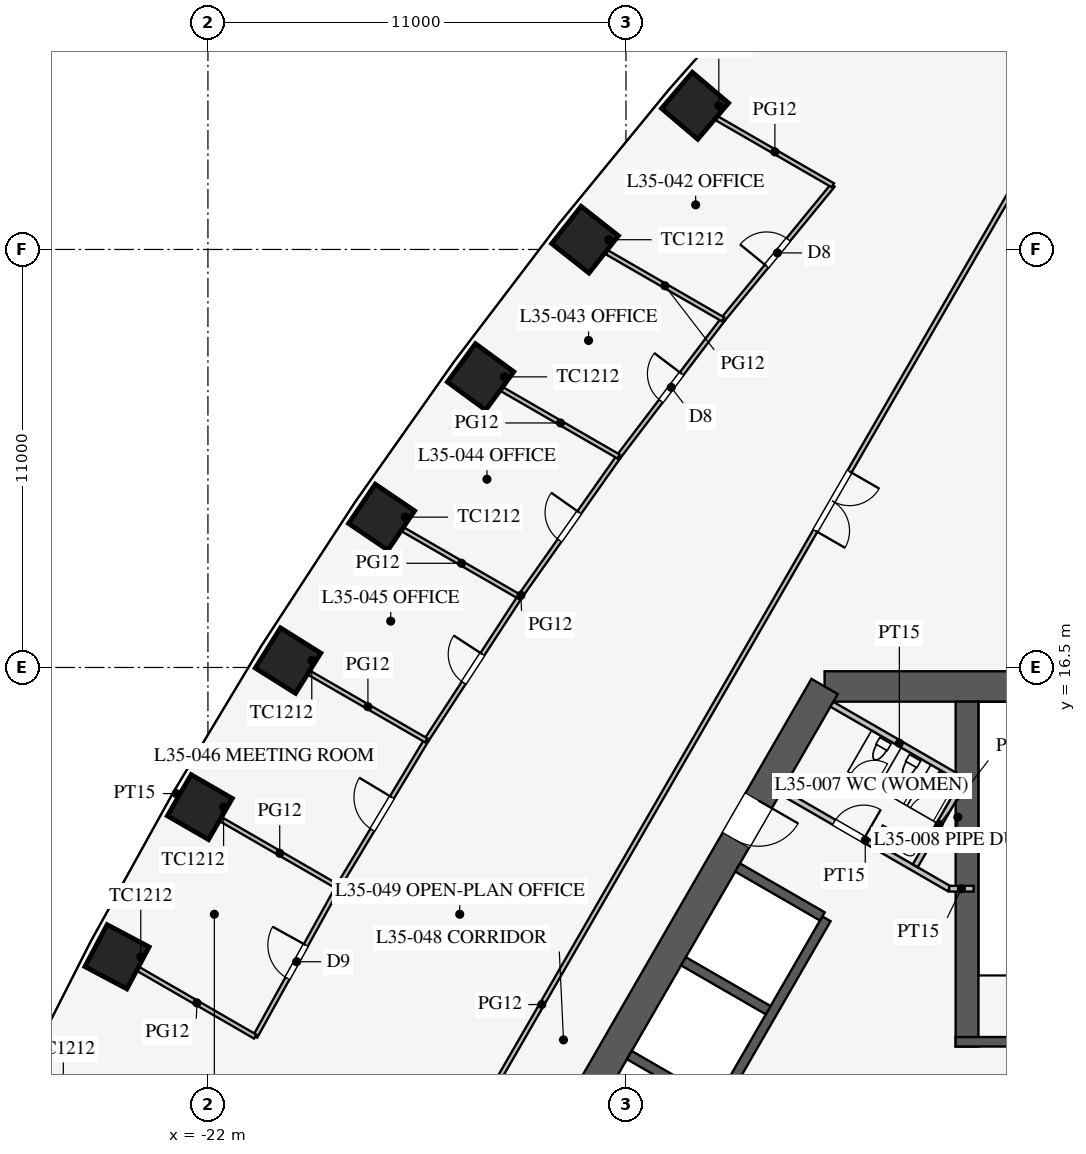
"""IFC4 building model, lengths in metres.
Left out: names, types, materials, properties, quantities, classifications, styles, units other than length and angle.
Written with IfcOpenShell. Run it as: python <this file> out.ifc"""

import sys

from ifc_helpers import new_model, si_unit, direction, frame, frame_2d, origin, origin_2d, place, context, subcontext, project, spatial, rectangle, extrude, element, fill, save


model = new_model("IFC4")
c1 = context("Model", 3, precision=1e-05, world=origin(), true_north=direction((0.0, 1.0)))
c2 = subcontext(c1, "Body", "Model", "MODEL_VIEW")
j1 = project(units=[si_unit("LENGTHUNIT", "METRE"), si_unit("PLANEANGLEUNIT", "RADIAN")], contexts=[c1])
p1 = place(None, origin())
s1 = spatial("IfcSite", under=j1, at=p1, CompositionType="ELEMENT")
p2 = place(p1, origin())
s2 = spatial("IfcBuilding", under=s1, at=p2, CompositionType="ELEMENT")
p3 = place(p2, frame((0.0, 0.0, 153.5)))
s3 = spatial("IfcBuildingStorey", under=s2, at=p3, CompositionType="ELEMENT", Elevation=153.5)
for number, where, z_axis, x_axis in (
    (1, (-9.182, 31.282, 0.0), (0.0, 0.0, 1.0), (-0.648, -0.762, 0.0)),
    (2, (-12.077, 27.757, 0.0), (0.0, 0.0, 1.0), (-0.62, -0.785, 0.0)),
    (3, (-14.825, 24.148, 0.0), (0.0, 0.0, 1.0), (-0.591, -0.807, 0.0)),
    (4, (-17.43, 20.456, 0.0), (0.0, 0.0, 1.0), (-0.561, -0.828, 0.0)),
    (5, (-19.893, 16.681, 0.0), (0.0, 0.0, 1.0), (-0.531, -0.847, 0.0)),
    (6, (-22.213, 12.825, 0.0), (0.0, 0.0, 1.0), (-0.5, -0.866, 0.0)),
    (7, (-24.393, 8.887, 0.0), (0.0, 0.0, 1.0), (-0.468, -0.883, 0.0)),
):
    element("IfcColumn", number, at=place(p3, frame(where, z_axis=z_axis, x_axis=x_axis)), inside=s3, PredefinedType="COLUMN", context=c2, shape_type="SweptSolid", body=[
        extrude(rectangle(XDim=1.25, YDim=1.25, at=origin_2d()), origin(), (0.0, 0.0, 1.0), 4.2),
    ])
p4 = place(p3, frame((5.773, 16.0, 0.0), z_axis=(0.0, 0.0, 1.0), x_axis=(-1.0, 0.0, 0.0)))
e8 = element("IfcWall", 8, at=p4, inside=s3, PredefinedType="SHEAR", context=c2, shape_type="SweptSolid", body=[
    extrude(rectangle(XDim=11.547, YDim=0.8, at=frame_2d((5.773, 0.0))), origin(), (0.0, 0.0, 1.0), 4.2),
])
p5 = place(p3, frame((-5.773, 16.0, 0.0), z_axis=(0.0, 0.0, 1.0), x_axis=(-0.500002442456, -0.866023993627, 0.0)))
e9 = element("IfcWall", 9, at=p5, inside=s3, PredefinedType="SHEAR", context=c2, shape_type="SweptSolid", body=[
    extrude(rectangle(XDim=21.939, YDim=0.8, at=frame_2d((10.97, 0.0))), origin(), (0.0, 0.0, 1.0), 4.2),
])
p6 = place(p5, frame((17.27, 0.0, 0.0)))
e10 = element("IfcOpeningElement", 10, at=p6, cuts=e9, PredefinedType="OPENING", context=c2, shape_type="SweptSolid", body=[
    extrude(rectangle(XDim=1.2, YDim=2.1, at=frame_2d((0.6, 1.05))), frame((0.0, 0.41, 0.0), z_axis=(0.0, -1.0, 0.0), x_axis=(1.0, 0.0, 0.0)), (0.0, 0.0, 1.0), 0.82),
])
p7 = place(p5, frame((3.47, 0.0, 0.0)))
e11 = element("IfcOpeningElement", 11, at=p7, cuts=e9, PredefinedType="OPENING", context=c2, shape_type="SweptSolid", body=[
    extrude(rectangle(XDim=1.2, YDim=2.1, at=frame_2d((0.6, 1.05))), frame((0.0, 0.41, 0.0), z_axis=(0.0, -1.0, 0.0), x_axis=(1.0, 0.0, 0.0)), (0.0, 0.0, 1.0), 0.82),
])
p8 = place(p3, frame((-5.724, 9.886, 0.0), z_axis=(0.0, 0.0, 1.0), x_axis=(-0.500001763848, -0.866024385424, 0.0)))
e12 = element("IfcWall", 12, at=p8, inside=s3, PredefinedType="SHEAR", context=c2, shape_type="SweptSolid", body=[
    extrude(rectangle(XDim=11.4, YDim=0.25, at=frame_2d((5.7, 0.0))), origin(), (0.0, 0.0, 1.0), 4.2),
])
p9 = place(p8, frame((6.525, 0.0, 0.0)))
e13 = element("IfcOpeningElement", 13, at=p9, cuts=e12, PredefinedType="OPENING", context=c2, shape_type="SweptSolid", body=[
    extrude(rectangle(XDim=1.2, YDim=2.2, at=frame_2d((0.6, 1.1))), frame((0.0, 0.135, 0.0), z_axis=(0.0, -1.0, 0.0), x_axis=(1.0, 0.0, 0.0)), (0.0, 0.0, 1.0), 0.27),
])
p10 = place(p8, frame((9.375, 0.0, 0.0)))
e14 = element("IfcOpeningElement", 14, at=p10, cuts=e12, PredefinedType="OPENING", context=c2, shape_type="SweptSolid", body=[
    extrude(rectangle(XDim=1.2, YDim=2.2, at=frame_2d((0.6, 1.1))), frame((0.0, 0.135, 0.0), z_axis=(0.0, -1.0, 0.0), x_axis=(1.0, 0.0, 0.0)), (0.0, 0.0, 1.0), 0.27),
])
p11 = place(p3, frame((-5.832, 9.949, 0.0), z_axis=(0.0, 0.0, 1.0), x_axis=(-0.866029291668, 0.499993265928, 0.0)))
e15 = element("IfcWall", 15, at=p11, inside=s3, PredefinedType="SHEAR", context=c2, shape_type="SweptSolid", body=[
    extrude(rectangle(XDim=2.575, YDim=0.25, at=frame_2d((1.288, 0.0))), origin(), (0.0, 0.0, 1.0), 4.2),
])
for number, where, z_axis, x_axis in (
    (16, (-7.257, 7.481, 0.0), (0.0, 0.0, 1.0), (-0.866, 0.5, 0.0)),
    (17, (-8.682, 5.012, 0.0), (0.0, 0.0, 1.0), (-0.866, 0.5, 0.0)),
):
    element("IfcWall", number, at=place(p3, frame(where, z_axis=z_axis, x_axis=x_axis)), inside=s3, PredefinedType="SHEAR", context=c2, shape_type="SweptSolid", body=[
        extrude(rectangle(XDim=2.575, YDim=0.25, at=frame_2d((1.288, 0.0))), origin(), (0.0, 0.0, 1.0), 4.2),
    ])
p12 = place(p3, frame((-2.025, 6.525, 0.0), z_axis=(0.0, 0.0, 1.0), x_axis=(0.0, 1.0, 0.0)))
e18 = element("IfcWall", 18, at=p12, inside=s3, PredefinedType="SHEAR", context=c2, shape_type="SweptSolid", body=[
    extrude(rectangle(XDim=9.075, YDim=0.6, at=frame_2d((4.538, 0.0))), origin(), (0.0, 0.0, 1.0), 4.2),
])
p13 = place(p3, frame((2.325, 6.65, 0.0), z_axis=(0.0, 0.0, 1.0), x_axis=(-1.0, 0.0, 0.0)))
e19 = element("IfcWall", 19, at=p13, inside=s3, PredefinedType="SHEAR", context=c2, shape_type="SweptSolid", body=[
    extrude(rectangle(XDim=4.65, YDim=0.25, at=frame_2d((2.325, 0.0))), origin(), (0.0, 0.0, 1.0), 4.2),
])
p14 = place(p13, frame((1.525, 0.0, 0.0)))
e20 = element("IfcOpeningElement", 20, at=p14, cuts=e19, PredefinedType="OPENING", context=c2, shape_type="SweptSolid", body=[
    extrude(rectangle(XDim=1.6, YDim=2.1, at=frame_2d((0.8, 1.05))), frame((0.0, 0.135, 0.0), z_axis=(0.0, -1.0, 0.0), x_axis=(1.0, 0.0, 0.0)), (0.0, 0.0, 1.0), 0.27),
])
p15 = place(p3, frame((-2.495, 10.678, 0.0), z_axis=(0.0, 0.0, 1.0), x_axis=(-0.86602216432, 0.500005610874, 0.0)))
e21 = element("IfcWall", 21, at=p15, inside=s3, PredefinedType="PARTITIONING", context=c2, shape_type="SweptSolid", body=[
    extrude(rectangle(XDim=5.1, YDim=0.15, at=frame_2d((2.55, 0.0))), origin(), (0.0, 0.0, 1.0), 4.0),
])
p16 = place(p15, frame((2.6, 0.0, 0.0)))
e22 = element("IfcOpeningElement", 22, at=p16, cuts=e21, PredefinedType="OPENING", context=c2, shape_type="SweptSolid", body=[
    extrude(rectangle(XDim=0.9, YDim=2.1, at=frame_2d((0.45, 1.05))), frame((0.0, 0.085, 0.0), z_axis=(0.0, -1.0, 0.0), x_axis=(1.0, 0.0, 0.0)), (0.0, 0.0, 1.0), 0.17),
])
p17 = place(p3, frame((-2.495, 10.678, 0.0), z_axis=(0.0, 0.0, 1.0), x_axis=(1.0, 0.0, 0.0)))
e23 = element("IfcWall", 23, at=p17, inside=s3, PredefinedType="PARTITIONING", context=c2, shape_type="SweptSolid", body=[
    extrude(rectangle(XDim=0.645, YDim=0.15, at=frame_2d((0.323, 0.0))), origin(), (0.0, 0.0, 1.0), 4.0),
])
p18 = place(p3, frame((-2.031, 13.482, 0.0), z_axis=(0.0, 0.0, 1.0), x_axis=(-0.866050731258, 0.499956128963, 0.0)))
e24 = element("IfcWall", 24, at=p18, inside=s3, PredefinedType="PARTITIONING", context=c2, shape_type="SweptSolid", body=[
    extrude(rectangle(XDim=4.1, YDim=0.15, at=frame_2d((2.05, 0.0))), origin(), (0.0, 0.0, 1.0), 4.0),
])
p19 = place(p3, frame((-3.389, 11.281, 0.0), z_axis=(0.0, 0.0, 1.0), x_axis=(0.499989096993, 0.866031698547, 0.0)))
e25 = element("IfcWall", 25, at=p19, inside=s3, PredefinedType="PARTITIONING", context=c2, shape_type="SweptSolid", body=[
    extrude(rectangle(XDim=2.51, YDim=0.15, at=frame_2d((1.255, 0.0))), origin(), (0.0, 0.0, 1.0), 4.0),
])
p20 = place(p3, frame((-0.016, 30.491, 0.0), z_axis=(0.0, 0.0, 1.0), x_axis=(-0.50000091641, -0.866024874695, 0.0)))
e26 = element("IfcWall", 26, at=p20, inside=s3, PredefinedType="PARTITIONING", context=c2, shape_type="SweptSolid", body=[
    extrude(rectangle(XDim=52.796, YDim=0.12, at=frame_2d((26.398, 0.0))), origin(), (0.0, 0.0, 1.0), 2.9),
])
p21 = place(p20, frame((10.2, 0.0, 0.15)))
e27 = element("IfcOpeningElement", 27, at=p21, cuts=e26, PredefinedType="OPENING", context=c2, shape_type="SweptSolid", body=[
    extrude(rectangle(XDim=1.8, YDim=2.1, at=frame_2d((0.9, 1.05))), frame((0.0, 0.07, 0.0), z_axis=(0.0, -1.0, 0.0), x_axis=(1.0, 0.0, 0.0)), (0.0, 0.0, 1.0), 0.14),
])
p22 = place(p20, frame((40.8, 0.0, 0.15)))
e28 = element("IfcOpeningElement", 28, at=p22, cuts=e26, PredefinedType="OPENING", context=c2, shape_type="SweptSolid", body=[
    extrude(rectangle(XDim=1.8, YDim=2.1, at=frame_2d((0.9, 1.05))), frame((0.0, 0.07, 0.0), z_axis=(0.0, -1.0, 0.0), x_axis=(1.0, 0.0, 0.0)), (0.0, 0.0, 1.0), 0.14),
])
p23 = place(p3, frame((-22.758, 13.139, 0.0), z_axis=(0.0, 0.0, 1.0), x_axis=(-0.866063163075, 0.499934593286, 0.0)))
e29 = element("IfcWall", 29, at=p23, inside=s3, PredefinedType="PARTITIONING", context=c2, shape_type="SweptSolid", body=[
    extrude(rectangle(XDim=0.166, YDim=0.15, at=frame_2d((0.083, 0.0))), origin(), (0.0, 0.0, 1.0), 2.9),
])
p24 = place(p3, frame((-18.576, 10.725, 0.0), z_axis=(0.0, 0.0, 1.0), x_axis=(-0.484292898211, -0.874905931368, 0.0)))
e30 = element("IfcWall", 30, at=p24, inside=s3, PredefinedType="PARTITIONING", context=c2, shape_type="SweptSolid", body=[
    extrude(rectangle(XDim=4.501, YDim=0.12, at=frame_2d((2.25, 0.0))), origin(), (0.0, 0.0, 1.0), 2.9),
])
p25 = place(p24, frame((1.75, 0.0, 0.15)))
e31 = element("IfcOpeningElement", 31, at=p25, cuts=e30, PredefinedType="OPENING", context=c2, shape_type="SweptSolid", body=[
    extrude(rectangle(XDim=1.0, YDim=2.1, at=frame_2d((0.5, 1.05))), frame((0.0, 0.07, 0.0), z_axis=(0.0, -1.0, 0.0), x_axis=(1.0, 0.0, 0.0)), (0.0, 0.0, 1.0), 0.14),
])
p26 = place(p3, frame((-11.192, 22.05, 0.0), z_axis=(0.0, 0.0, 1.0), x_axis=(-0.575987178736, -0.817458726745, 0.0)))
e32 = element("IfcWall", 32, at=p26, inside=s3, PredefinedType="PARTITIONING", context=c2, shape_type="SweptSolid", body=[
    extrude(rectangle(XDim=4.518, YDim=0.12, at=frame_2d((2.259, 0.0))), origin(), (0.0, 0.0, 1.0), 2.9),
])
p27 = place(p26, frame((1.8, 0.0, 0.15)))
e33 = element("IfcOpeningElement", 33, at=p27, cuts=e32, PredefinedType="OPENING", context=c2, shape_type="SweptSolid", body=[
    extrude(rectangle(XDim=0.9, YDim=2.1, at=frame_2d((0.45, 1.05))), frame((0.0, 0.07, 0.0), z_axis=(0.0, -1.0, 0.0), x_axis=(1.0, 0.0, 0.0)), (0.0, 0.0, 1.0), 0.14),
])
p28 = place(p3, frame((-8.447, 25.661, 0.0), z_axis=(0.0, 0.0, 1.0), x_axis=(-0.605274299339, -0.796016973789, 0.0)))
e34 = element("IfcWall", 34, at=p28, inside=s3, PredefinedType="PARTITIONING", context=c2, shape_type="SweptSolid", body=[
    extrude(rectangle(XDim=4.536, YDim=0.12, at=frame_2d((2.268, 0.0))), origin(), (0.0, 0.0, 1.0), 2.9),
])
p29 = place(p28, frame((1.8, 0.0, 0.15)))
e35 = element("IfcOpeningElement", 35, at=p29, cuts=e34, PredefinedType="OPENING", context=c2, shape_type="SweptSolid", body=[
    extrude(rectangle(XDim=0.9, YDim=2.1, at=frame_2d((0.45, 1.05))), frame((0.0, 0.07, 0.0), z_axis=(0.0, -1.0, 0.0), x_axis=(1.0, 0.0, 0.0)), (0.0, 0.0, 1.0), 0.14),
])
p30 = place(p3, frame((-5.556, 29.188, 0.0), z_axis=(0.0, 0.0, 1.0), x_axis=(-0.633843962561, -0.773460943503, 0.0)))
e36 = element("IfcWall", 36, at=p30, inside=s3, PredefinedType="PARTITIONING", context=c2, shape_type="SweptSolid", body=[
    extrude(rectangle(XDim=4.561, YDim=0.12, at=frame_2d((2.28, 0.0))), origin(), (0.0, 0.0, 1.0), 2.9),
])
p31 = place(p30, frame((1.85, 0.0, 0.15)))
e37 = element("IfcOpeningElement", 37, at=p31, cuts=e36, PredefinedType="OPENING", context=c2, shape_type="SweptSolid", body=[
    extrude(rectangle(XDim=0.9, YDim=2.1, at=frame_2d((0.45, 1.05))), frame((0.0, 0.07, 0.0), z_axis=(0.0, -1.0, 0.0), x_axis=(1.0, 0.0, 0.0)), (0.0, 0.0, 1.0), 0.14),
])
p32 = place(p3, frame((-16.256, 14.581, 0.0), z_axis=(0.0, 0.0, 1.0), x_axis=(-0.515548366618, -0.856860479703, 0.0)))
e38 = element("IfcWall", 38, at=p32, inside=s3, PredefinedType="PARTITIONING", context=c2, shape_type="SweptSolid", body=[
    extrude(rectangle(XDim=4.501, YDim=0.12, at=frame_2d((2.25, 0.0))), origin(), (0.0, 0.0, 1.0), 2.9),
])
p33 = place(p32, frame((1.75, 0.0, 0.15)))
e39 = element("IfcOpeningElement", 39, at=p33, cuts=e38, PredefinedType="OPENING", context=c2, shape_type="SweptSolid", body=[
    extrude(rectangle(XDim=1.0, YDim=2.1, at=frame_2d((0.5, 1.05))), frame((0.0, 0.07, 0.0), z_axis=(0.0, -1.0, 0.0), x_axis=(1.0, 0.0, 0.0)), (0.0, 0.0, 1.0), 0.14),
])
p34 = place(p3, frame((-13.795, 18.357, 0.0), z_axis=(0.0, 0.0, 1.0), x_axis=(-0.546069464151, -0.837739900161, 0.0)))
e40 = element("IfcWall", 40, at=p34, inside=s3, PredefinedType="PARTITIONING", context=c2, shape_type="SweptSolid", body=[
    extrude(rectangle(XDim=4.507, YDim=0.12, at=frame_2d((2.253, 0.0))), origin(), (0.0, 0.0, 1.0), 2.9),
])
p35 = place(p34, frame((1.8, 0.0, 0.15)))
e41 = element("IfcOpeningElement", 41, at=p35, cuts=e40, PredefinedType="OPENING", context=c2, shape_type="SweptSolid", body=[
    extrude(rectangle(XDim=0.9, YDim=2.1, at=frame_2d((0.45, 1.05))), frame((0.0, 0.07, 0.0), z_axis=(0.0, -1.0, 0.0), x_axis=(1.0, 0.0, 0.0)), (0.0, 0.0, 1.0), 0.14),
])
p36 = place(p3, frame((-18.576, 10.725, 0.0), z_axis=(0.0, 0.0, 1.0), x_axis=(-0.866030760678, 0.499990721473, 0.0)))
e42 = element("IfcWall", 42, at=p36, inside=s3, PredefinedType="PARTITIONING", context=c2, shape_type="SweptSolid", body=[
    extrude(rectangle(XDim=3.545, YDim=0.12, at=frame_2d((1.772, 0.0))), origin(), (0.0, 0.0, 1.0), 2.8),
])
p37 = place(p3, frame((-20.756, 6.787, 0.0), z_axis=(0.0, 0.0, 1.0), x_axis=(-0.866038754309, 0.499976875499, 0.0)))
e43 = element("IfcWall", 43, at=p37, inside=s3, PredefinedType="PARTITIONING", context=c2, shape_type="SweptSolid", body=[
    extrude(rectangle(XDim=3.544, YDim=0.12, at=frame_2d((1.772, 0.0))), origin(), (0.0, 0.0, 1.0), 2.8),
])
p38 = place(p3, frame((-11.192, 22.05, 0.0), z_axis=(0.0, 0.0, 1.0), x_axis=(-0.86605108476, 0.499955516607, 0.0)))
e44 = element("IfcWall", 44, at=p38, inside=s3, PredefinedType="PARTITIONING", context=c2, shape_type="SweptSolid", body=[
    extrude(rectangle(XDim=3.536, YDim=0.12, at=frame_2d((1.768, 0.0))), origin(), (0.0, 0.0, 1.0), 2.6),
])
p39 = place(p3, frame((-8.447, 25.661, 0.0), z_axis=(0.0, 0.0, 1.0), x_axis=(-0.866025485263, 0.499999858875, 0.0)))
e45 = element("IfcWall", 45, at=p39, inside=s3, PredefinedType="PARTITIONING", context=c2, shape_type="SweptSolid", body=[
    extrude(rectangle(XDim=3.53, YDim=0.12, at=frame_2d((1.765, 0.0))), origin(), (0.0, 0.0, 1.0), 2.8),
])
p40 = place(p3, frame((-5.556, 29.188, 0.0), z_axis=(0.0, 0.0, 1.0), x_axis=(-0.866028552163, 0.499994546809, 0.0)))
e46 = element("IfcWall", 46, at=p40, inside=s3, PredefinedType="PARTITIONING", context=c2, shape_type="SweptSolid", body=[
    extrude(rectangle(XDim=3.521, YDim=0.12, at=frame_2d((1.76, 0.0))), origin(), (0.0, 0.0, 1.0), 2.9),
])
p41 = place(p3, frame((-16.256, 14.581, 0.0), z_axis=(0.0, 0.0, 1.0), x_axis=(-0.866008926066, 0.500028539159, 0.0)))
e47 = element("IfcWall", 47, at=p41, inside=s3, PredefinedType="PARTITIONING", context=c2, shape_type="SweptSolid", body=[
    extrude(rectangle(XDim=3.544, YDim=0.12, at=frame_2d((1.772, 0.0))), origin(), (0.0, 0.0, 1.0), 2.8),
])
p42 = place(p3, frame((-13.795, 18.357, 0.0), z_axis=(0.0, 0.0, 1.0), x_axis=(-0.866045526189, 0.499965145353, 0.0)))
e48 = element("IfcWall", 48, at=p42, inside=s3, PredefinedType="PARTITIONING", context=c2, shape_type="SweptSolid", body=[
    extrude(rectangle(XDim=3.541, YDim=0.12, at=frame_2d((1.771, 0.0))), origin(), (0.0, 0.0, 1.0), 2.9),
])
p43 = place(p16, frame((0.9, 0.0, 0.0), z_axis=(0.0, 0.0, 1.0), x_axis=(-1.0, 0.0, 0.0)))
e49 = element("IfcDoor", 49, at=p43, inside=s3, OperationType="SINGLE_SWING_RIGHT", PredefinedType="DOOR", context=c2, shape_type="SweptSolid", body=[
    extrude(rectangle(XDim=0.9, YDim=2.1, at=frame_2d((0.45, 1.05))), frame((0.0, 0.025, 0.0), z_axis=(0.0, -1.0, 0.0), x_axis=(1.0, 0.0, 0.0)), (0.0, 0.0, 1.0), 0.05),
])
fill(e22, e49)
p44 = place(p7, origin())
e50 = element("IfcDoor", 50, at=p44, inside=s3, OperationType="SINGLE_SWING_LEFT", PredefinedType="DOOR", context=c2, shape_type="SweptSolid", body=[
    extrude(rectangle(XDim=1.2, YDim=2.1, at=frame_2d((0.6, 1.05))), frame((0.0, 0.025, 0.0), z_axis=(0.0, -1.0, 0.0), x_axis=(1.0, 0.0, 0.0)), (0.0, 0.0, 1.0), 0.05),
])
fill(e11, e50)
p45 = place(p31, frame((0.9, 0.0, 0.0), z_axis=(0.0, 0.0, 1.0), x_axis=(-1.0, 0.0, 0.0)))
e51 = element("IfcDoor", 51, at=p45, inside=s3, OperationType="SINGLE_SWING_LEFT", PredefinedType="DOOR", context=c2, shape_type="SweptSolid", body=[
    extrude(rectangle(XDim=0.9, YDim=2.1, at=frame_2d((0.45, 1.05))), frame((0.0, 0.025, 0.0), z_axis=(0.0, -1.0, 0.0), x_axis=(1.0, 0.0, 0.0)), (0.0, 0.0, 1.0), 0.05),
])
fill(e37, e51)
p46 = place(p29, frame((0.9, 0.0, 0.0), z_axis=(0.0, 0.0, 1.0), x_axis=(-1.0, 0.0, 0.0)))
e52 = element("IfcDoor", 52, at=p46, inside=s3, OperationType="SINGLE_SWING_RIGHT", PredefinedType="DOOR", context=c2, shape_type="SweptSolid", body=[
    extrude(rectangle(XDim=0.9, YDim=2.1, at=frame_2d((0.45, 1.05))), frame((0.0, 0.025, 0.0), z_axis=(0.0, -1.0, 0.0), x_axis=(1.0, 0.0, 0.0)), (0.0, 0.0, 1.0), 0.05),
])
fill(e35, e52)
p47 = place(p27, frame((0.9, 0.0, 0.0), z_axis=(0.0, 0.0, 1.0), x_axis=(-1.0, 0.0, 0.0)))
e53 = element("IfcDoor", 53, at=p47, inside=s3, OperationType="SINGLE_SWING_RIGHT", PredefinedType="DOOR", context=c2, shape_type="SweptSolid", body=[
    extrude(rectangle(XDim=0.9, YDim=2.1, at=frame_2d((0.45, 1.05))), frame((0.0, 0.025, 0.0), z_axis=(0.0, -1.0, 0.0), x_axis=(1.0, 0.0, 0.0)), (0.0, 0.0, 1.0), 0.05),
])
fill(e33, e53)
p48 = place(p35, frame((0.9, 0.0, 0.0), z_axis=(0.0, 0.0, 1.0), x_axis=(-1.0, 0.0, 0.0)))
e54 = element("IfcDoor", 54, at=p48, inside=s3, OperationType="SINGLE_SWING_RIGHT", PredefinedType="DOOR", context=c2, shape_type="SweptSolid", body=[
    extrude(rectangle(XDim=0.9, YDim=2.1, at=frame_2d((0.45, 1.05))), frame((0.0, 0.025, 0.0), z_axis=(0.0, -1.0, 0.0), x_axis=(1.0, 0.0, 0.0)), (0.0, 0.0, 1.0), 0.05),
])
fill(e41, e54)
p49 = place(p33, frame((1.0, 0.0, 0.0), z_axis=(0.0, 0.0, 1.0), x_axis=(-1.0, 0.0, 0.0)))
e55 = element("IfcDoor", 55, at=p49, inside=s3, OperationType="SINGLE_SWING_RIGHT", PredefinedType="DOOR", context=c2, shape_type="SweptSolid", body=[
    extrude(rectangle(XDim=1.0, YDim=2.1, at=frame_2d((0.5, 1.05))), frame((0.0, 0.025, 0.0), z_axis=(0.0, -1.0, 0.0), x_axis=(1.0, 0.0, 0.0)), (0.0, 0.0, 1.0), 0.05),
])
fill(e39, e55)
p50 = place(p25, frame((1.0, 0.0, 0.0), z_axis=(0.0, 0.0, 1.0), x_axis=(-1.0, 0.0, 0.0)))
e56 = element("IfcDoor", 56, at=p50, inside=s3, OperationType="SINGLE_SWING_RIGHT", PredefinedType="DOOR", context=c2, shape_type="SweptSolid", body=[
    extrude(rectangle(XDim=1.0, YDim=2.1, at=frame_2d((0.5, 1.05))), frame((0.0, 0.025, 0.0), z_axis=(0.0, -1.0, 0.0), x_axis=(1.0, 0.0, 0.0)), (0.0, 0.0, 1.0), 0.05),
])
fill(e31, e56)
p51 = place(p21, origin())
e57 = element("IfcDoor", 57, at=p51, inside=s3, OperationType="DOUBLE_DOOR_SINGLE_SWING", PredefinedType="DOOR", context=c2, shape_type="SweptSolid", body=[
    extrude(rectangle(XDim=1.8, YDim=2.1, at=frame_2d((0.9, 1.05))), frame((0.0, 0.025, 0.0), z_axis=(0.0, -1.0, 0.0), x_axis=(1.0, 0.0, 0.0)), (0.0, 0.0, 1.0), 0.05),
])
fill(e27, e57)
save(model, sys.argv[1])
